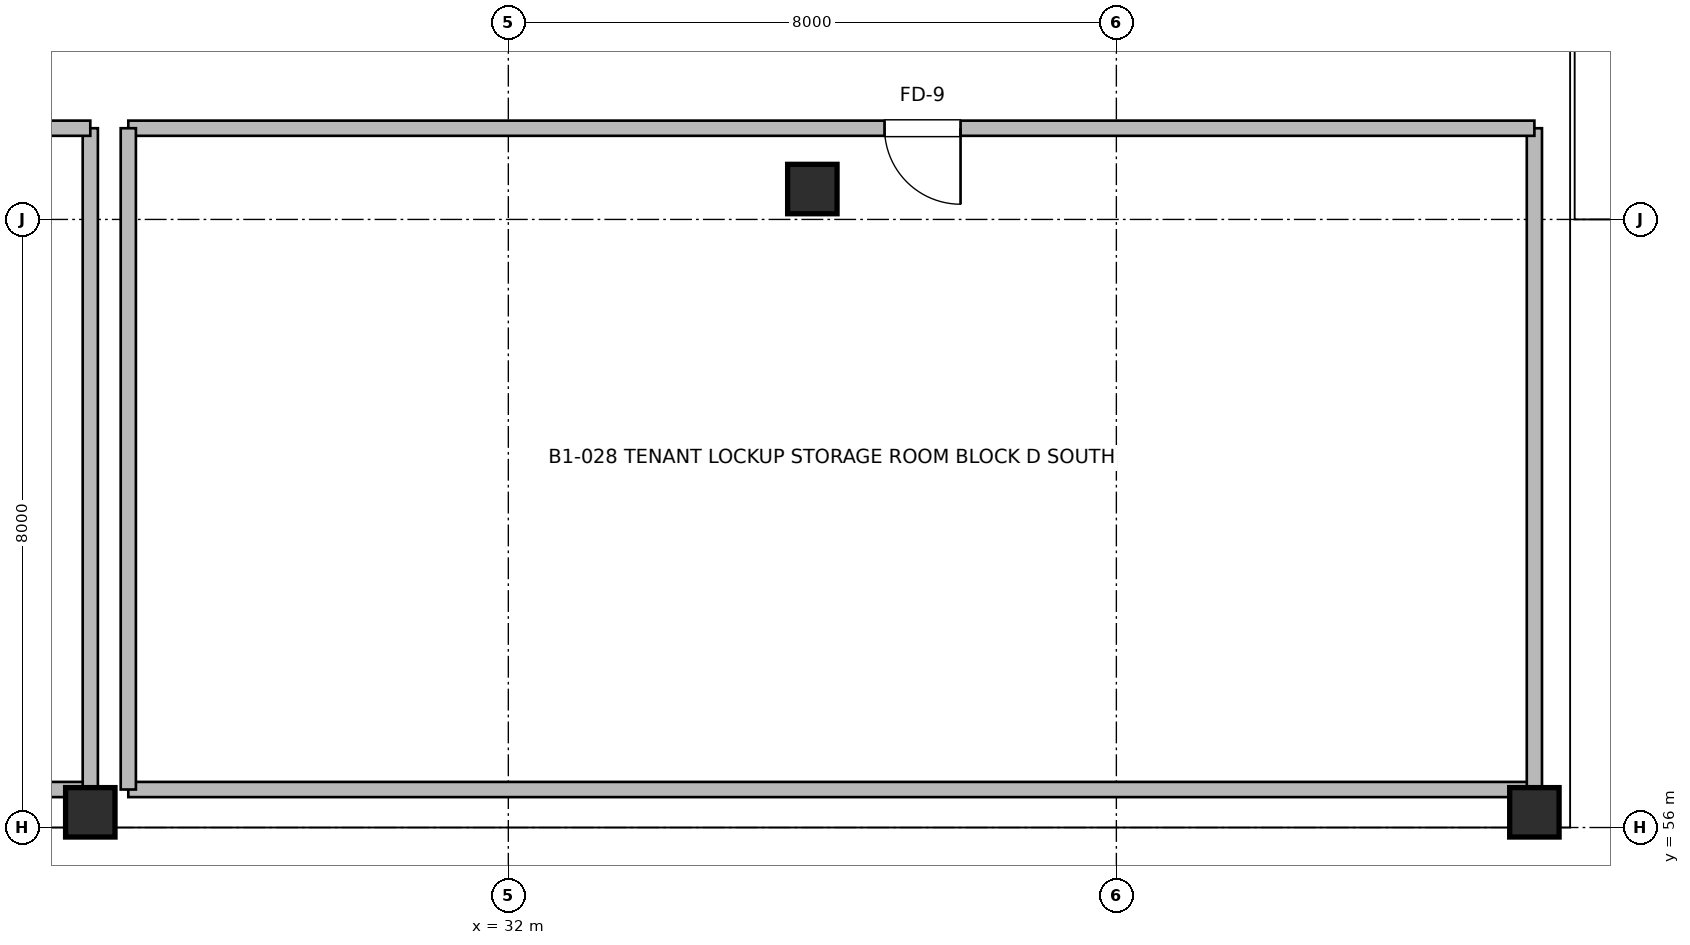
"""IFC4 building model, lengths in metres.
Left out: names, types, materials, properties, quantities, classifications, styles, units other than length and angle.
Written with IfcOpenShell. Run it as: python <this file> out.ifc"""

import sys

from ifc_helpers import new_model, si_unit, direction, frame, frame_2d, origin, origin_2d, place, context, subcontext, project, spatial, rectangle, extrude, element, fill, save


model = new_model("IFC4")
c1 = context("Model", 3, precision=1e-05, world=origin(), true_north=direction((0.0, 1.0)))
c2 = subcontext(c1, "Body", "Model", "MODEL_VIEW")
j1 = project(units=[si_unit("LENGTHUNIT", "METRE"), si_unit("PLANEANGLEUNIT", "RADIAN")], contexts=[c1])
p1 = place(None, origin())
s1 = spatial("IfcSite", under=j1, at=p1, CompositionType="ELEMENT")
p2 = place(p1, origin())
s2 = spatial("IfcBuilding", under=s1, at=p2, CompositionType="ELEMENT")
p3 = place(p2, frame((0.0, 0.0, -3.84)))
s3 = spatial("IfcBuildingStorey", under=s2, at=p3, CompositionType="ELEMENT", Elevation=-3.84)
for number, where, z_axis, x_axis in (
    (1, (26.5, 56.2, 0.0), (0.0, 0.0, 1.0), (1.0, 0.0, 0.0)),
    (2, (36.0, 64.4, 0.0), (0.0, 0.0, 1.0), (1.0, 0.0, 0.0)),
    (3, (45.5, 56.2, 0.0), (0.0, 0.0, 1.0), (1.0, 0.0, 0.0)),
):
    element("IfcColumn", number, at=place(p3, frame(where, z_axis=z_axis, x_axis=x_axis)), inside=s3, PredefinedType="COLUMN", context=c2, shape_type="SweptSolid", body=[
        extrude(rectangle(XDim=0.65, YDim=0.65, at=origin_2d()), origin(), (0.0, 0.0, 1.0), 3.84),
    ])
p4 = place(p3, frame((0.8, 56.5, 0.0), z_axis=(0.0, 0.0, 1.0), x_axis=(1.0, 0.0, 0.0)))
e4 = element("IfcWall", 4, at=p4, inside=s3, PredefinedType="SOLIDWALL", context=c2, shape_type="SweptSolid", body=[
    extrude(rectangle(XDim=25.7, YDim=0.2, at=frame_2d((12.85, 0.0))), origin(), (0.0, 0.0, 1.0), 3.02),
])
p5 = place(p3, frame((26.5, 56.5, 0.0), z_axis=(0.0, 0.0, 1.0), x_axis=(0.0, 1.0, 0.0)))
e5 = element("IfcWall", 5, at=p5, inside=s3, PredefinedType="SOLIDWALL", context=c2, shape_type="SweptSolid", body=[
    extrude(rectangle(XDim=8.7, YDim=0.2, at=frame_2d((4.35, 0.0))), origin(), (0.0, 0.0, 1.0), 3.52),
])
p6 = place(p3, frame((26.5, 65.2, 0.0), z_axis=(0.0, 0.0, 1.0), x_axis=(-1.0, 0.0, 0.0)))
e6 = element("IfcWall", 6, at=p6, inside=s3, PredefinedType="SOLIDWALL", context=c2, shape_type="SweptSolid", body=[
    extrude(rectangle(XDim=25.7, YDim=0.2, at=frame_2d((12.85, 0.0))), origin(), (0.0, 0.0, 1.0), 3.52),
])
p7 = place(p6, frame((13.15, 0.0, 0.0)))
e7 = element("IfcOpeningElement", 7, at=p7, cuts=e6, PredefinedType="OPENING", context=c2, shape_type="SweptSolid", body=[
    extrude(rectangle(XDim=0.95, YDim=2.1, at=frame_2d((0.475, 1.05))), frame((0.0, 0.11, 0.0), z_axis=(0.0, -1.0, 0.0), x_axis=(1.0, 0.0, 0.0)), (0.0, 0.0, 1.0), 0.22),
])
p8 = place(p3, frame((27.0, 56.5, 0.0), z_axis=(0.0, 0.0, 1.0), x_axis=(1.0, 0.0, 0.0)))
e8 = element("IfcWall", 8, at=p8, inside=s3, PredefinedType="SOLIDWALL", context=c2, shape_type="SweptSolid", body=[
    extrude(rectangle(XDim=18.5, YDim=0.2, at=frame_2d((9.25, 0.0))), origin(), (0.0, 0.0, 1.0), 3.52),
])
p9 = place(p3, frame((45.5, 56.5, 0.0), z_axis=(0.0, 0.0, 1.0), x_axis=(0.0, 1.0, 0.0)))
e9 = element("IfcWall", 9, at=p9, inside=s3, PredefinedType="SOLIDWALL", context=c2, shape_type="SweptSolid", body=[
    extrude(rectangle(XDim=8.7, YDim=0.2, at=frame_2d((4.35, 0.0))), origin(), (0.0, 0.0, 1.0), 3.52),
])
p10 = place(p3, frame((45.5, 65.2, 0.0), z_axis=(0.0, 0.0, 1.0), x_axis=(-1.0, 0.0, 0.0)))
e10 = element("IfcWall", 10, at=p10, inside=s3, PredefinedType="SOLIDWALL", context=c2, shape_type="SweptSolid", body=[
    extrude(rectangle(XDim=18.5, YDim=0.2, at=frame_2d((9.25, 0.0))), origin(), (0.0, 0.0, 1.0), 3.52),
])
p11 = place(p10, frame((7.55, 0.0, 0.0)))
e11 = element("IfcOpeningElement", 11, at=p11, cuts=e10, PredefinedType="OPENING", context=c2, shape_type="SweptSolid", body=[
    extrude(rectangle(XDim=1.0, YDim=2.1, at=frame_2d((0.5, 1.05))), frame((0.0, 0.11, 0.0), z_axis=(0.0, -1.0, 0.0), x_axis=(1.0, 0.0, 0.0)), (0.0, 0.0, 1.0), 0.22),
])
p12 = place(p3, frame((27.0, 65.2, 0.0), z_axis=(0.0, 0.0, 1.0), x_axis=(0.0, -1.0, 0.0)))
e12 = element("IfcWall", 12, at=p12, inside=s3, PredefinedType="SOLIDWALL", context=c2, shape_type="SweptSolid", body=[
    extrude(rectangle(XDim=8.7, YDim=0.2, at=frame_2d((4.35, 0.0))), origin(), (0.0, 0.0, 1.0), 3.52),
])
p13 = place(p11, origin())
e13 = element("IfcDoor", 13, at=p13, inside=s3, OperationType="SINGLE_SWING_LEFT", PredefinedType="DOOR", context=c2, shape_type="SweptSolid", body=[
    extrude(rectangle(XDim=1.0, YDim=2.1, at=frame_2d((0.5, 1.05))), frame((0.0, 0.025, 0.0), z_axis=(0.0, -1.0, 0.0), x_axis=(1.0, 0.0, 0.0)), (0.0, 0.0, 1.0), 0.05),
])
fill(e11, e13)
save(model, sys.argv[1])
